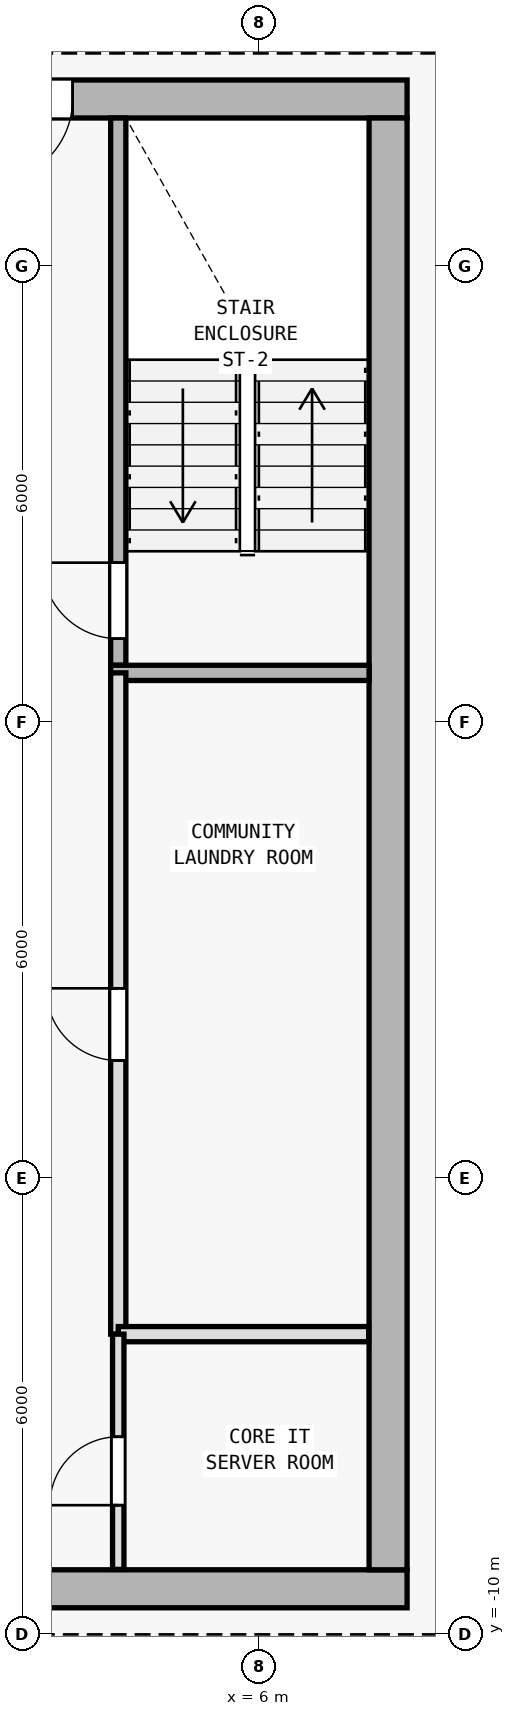
"""IFC4 building model, lengths in metres.
Left out: names, types, materials, properties, quantities, classifications, styles, units other than length and angle.
Written with IfcOpenShell. Run it as: python <this file> out.ifc"""

import sys

from ifc_helpers import new_model, si_unit, direction, frame, frame_2d, origin, origin_2d, place, context, subcontext, project, spatial, rectangle, i_section, extrude, element, fill, save


model = new_model("IFC4")
c1 = context("Model", 3, precision=1e-05, world=origin(), true_north=direction((0.0, 1.0)))
c2 = subcontext(c1, "Body", "Model", "MODEL_VIEW")
j1 = project(units=[si_unit("LENGTHUNIT", "METRE"), si_unit("PLANEANGLEUNIT", "RADIAN")], contexts=[c1])
p1 = place(None, origin())
s1 = spatial("IfcSite", under=j1, at=p1, CompositionType="ELEMENT")
p2 = place(p1, origin())
s2 = spatial("IfcBuilding", under=s1, at=p2, CompositionType="ELEMENT")
p3 = place(p2, frame((0.0, 0.0, 149.4)))
s3 = spatial("IfcBuildingStorey", under=s2, at=p3, CompositionType="ELEMENT", Elevation=149.4)
for number, where, z_axis, x_axis in (
    (1, (7.7, -9.4, 0.0), (0.0, 0.0, 1.0), (1.0, 0.0, 0.0)),
    (2, (7.7, 10.2, 0.0), (0.0, 0.0, 1.0), (1.0, 0.0, 0.0)),
    (3, (7.7, 0.4, 0.0), (0.0, 0.0, 1.0), (1.0, 0.0, 0.0)),
):
    element("IfcColumn", number, at=place(p3, frame(where, z_axis=z_axis, x_axis=x_axis)), inside=s3, PredefinedType="COLUMN", context=c2, shape_type="SweptSolid", body=[
        extrude(i_section(OverallWidth=0.404, OverallDepth=0.407, WebThickness=0.017, FlangeThickness=0.028, FilletRadius=0.015, at=origin_2d()), origin(), (0.0, 0.0, 1.0), 3.6),
    ])
p4 = place(p3, frame((-7.95, -9.4, 0.0), z_axis=(0.0, 0.0, 1.0), x_axis=(1.0, 0.0, 0.0)))
e4 = element("IfcWall", 4, at=p4, inside=s3, PredefinedType="SHEAR", context=c2, shape_type="SweptSolid", body=[
    extrude(rectangle(XDim=15.9, YDim=0.5, at=frame_2d((7.95, 0.0))), origin(), (0.0, 0.0, 1.0), 3.35),
])
p5 = place(p4, frame((9.6, 0.0, 0.0)))
e5 = element("IfcOpeningElement", 5, at=p5, cuts=e4, PredefinedType="OPENING", context=c2, shape_type="SweptSolid", body=[
    extrude(rectangle(XDim=1.5, YDim=2.2, at=frame_2d((0.75, 1.1))), frame((0.0, 0.26, 0.0), z_axis=(0.0, -1.0, 0.0), x_axis=(1.0, 0.0, 0.0)), (0.0, 0.0, 1.0), 0.52),
])
p6 = place(p3, frame((7.95, 10.2, 0.0), z_axis=(0.0, 0.0, 1.0), x_axis=(-1.0, 0.0, 0.0)))
e6 = element("IfcWall", 6, at=p6, inside=s3, PredefinedType="SHEAR", context=c2, shape_type="SweptSolid", body=[
    extrude(rectangle(XDim=15.9, YDim=0.5, at=frame_2d((7.95, 0.0))), origin(), (0.0, 0.0, 1.0), 3.35),
])
p7 = place(p6, frame((4.4, 0.0, 0.0)))
e7 = element("IfcOpeningElement", 7, at=p7, cuts=e6, PredefinedType="OPENING", context=c2, shape_type="SweptSolid", body=[
    extrude(rectangle(XDim=1.1, YDim=2.15, at=frame_2d((0.55, 1.075))), frame((0.0, 0.26, 0.0), z_axis=(0.0, -1.0, 0.0), x_axis=(1.0, 0.0, 0.0)), (0.0, 0.0, 1.0), 0.52),
])
p8 = place(p3, frame((7.7, 9.95, 0.0), z_axis=(0.0, 0.0, 1.0), x_axis=(0.0, -1.0, 0.0)))
e8 = element("IfcWall", 8, at=p8, inside=s3, PredefinedType="SHEAR", context=c2, shape_type="SweptSolid", body=[
    extrude(rectangle(XDim=19.1, YDim=0.5, at=frame_2d((9.55, 0.0))), origin(), (0.0, 0.0, 1.0), 3.35),
])
p9 = place(p3, frame((4.15, 2.75, 0.0), z_axis=(0.0, 0.0, 1.0), x_axis=(0.0, 1.0, 0.0)))
e9 = element("IfcWall", 9, at=p9, inside=s3, PredefinedType="SOLIDWALL", context=c2, shape_type="SweptSolid", body=[
    extrude(rectangle(XDim=7.2, YDim=0.2, at=frame_2d((3.6, 0.0))), origin(), (0.0, 0.0, 1.0), 3.35),
])
p10 = place(p9, frame((0.35, 0.0, 0.0)))
e10 = element("IfcOpeningElement", 10, at=p10, cuts=e9, PredefinedType="OPENING", context=c2, shape_type="SweptSolid", body=[
    extrude(rectangle(XDim=1.0, YDim=2.15, at=frame_2d((0.5, 1.075))), frame((0.0, 0.11, 0.0), z_axis=(0.0, -1.0, 0.0), x_axis=(1.0, 0.0, 0.0)), (0.0, 0.0, 1.0), 0.22),
])
p11 = place(p3, frame((4.05, 2.65, 0.0), z_axis=(0.0, 0.0, 1.0), x_axis=(1.0, 0.0, 0.0)))
e11 = element("IfcWall", 11, at=p11, inside=s3, PredefinedType="SOLIDWALL", context=c2, shape_type="SweptSolid", body=[
    extrude(rectangle(XDim=3.4, YDim=0.2, at=frame_2d((1.7, 0.0))), origin(), (0.0, 0.0, 1.0), 3.35),
])
p12 = place(p3, frame((4.15, -6.05, 0.0), z_axis=(0.0, 0.0, 1.0), x_axis=(0.0, 1.0, 0.0)))
e12 = element("IfcWall", 12, at=p12, inside=s3, PredefinedType="SOLIDWALL", context=c2, shape_type="SweptSolid", body=[
    extrude(rectangle(XDim=8.7, YDim=0.2, at=frame_2d((4.35, 0.0))), origin(), (0.0, 0.0, 1.0), 3.35),
])
p13 = place(p12, frame((3.6, 0.0, 0.0)))
e13 = element("IfcOpeningElement", 13, at=p13, cuts=e12, PredefinedType="OPENING", context=c2, shape_type="SweptSolid", body=[
    extrude(rectangle(XDim=0.95, YDim=2.1, at=frame_2d((0.475, 1.05))), frame((0.0, 0.11, 0.0), z_axis=(0.0, -1.0, 0.0), x_axis=(1.0, 0.0, 0.0)), (0.0, 0.0, 1.0), 0.22),
])
p14 = place(p3, frame((4.15, -6.05, 0.0), z_axis=(0.0, 0.0, 1.0), x_axis=(1.0, 0.0, 0.0)))
e14 = element("IfcWall", 14, at=p14, inside=s3, PredefinedType="SOLIDWALL", context=c2, shape_type="SweptSolid", body=[
    extrude(rectangle(XDim=3.295, YDim=0.2, at=frame_2d((1.647, 0.0))), origin(), (0.0, 0.0, 1.0), 3.35),
])
p15 = place(p3, frame((4.15, -9.145, 0.0), z_axis=(0.0, 0.0, 1.0), x_axis=(0.0, 1.0, 0.0)))
e15 = element("IfcWall", 15, at=p15, inside=s3, PredefinedType="PARTITIONING", context=c2, shape_type="SweptSolid", body=[
    extrude(rectangle(XDim=3.095, YDim=0.15, at=frame_2d((1.547, 0.0))), origin(), (0.0, 0.0, 1.0), 3.35),
])
p16 = place(p15, frame((0.845, 0.0, 0.0)))
e16 = element("IfcOpeningElement", 16, at=p16, cuts=e15, PredefinedType="OPENING", context=c2, shape_type="SweptSolid", body=[
    extrude(rectangle(XDim=0.9, YDim=2.1, at=frame_2d((0.45, 1.05))), frame((0.0, 0.085, 0.0), z_axis=(0.0, -1.0, 0.0), x_axis=(1.0, 0.0, 0.0)), (0.0, 0.0, 1.0), 0.17),
])
p17 = place(p3, frame((7.023, 12.36, 0.0), z_axis=(0.0, 0.0, 1.0), x_axis=(0.84376480085, -0.536713108511, 0.0)))
e17 = element("IfcWall", 17, at=p17, inside=s3, PredefinedType="PARTITIONING", context=c2, shape_type="SweptSolid", body=[
    extrude(rectangle(XDim=7.297, YDim=0.15, at=frame_2d((3.648, 0.0))), origin(), (0.0, 0.0, 1.0), 2.775),
])
p18 = place(p17, frame((3.198, 0.0, 0.0)))
e18 = element("IfcOpeningElement", 18, at=p18, cuts=e17, PredefinedType="OPENING", context=c2, shape_type="SweptSolid", body=[
    extrude(rectangle(XDim=0.9, YDim=2.1, at=frame_2d((0.45, 1.05))), frame((0.0, 0.085, 0.0), z_axis=(0.0, -1.0, 0.0), x_axis=(1.0, 0.0, 0.0)), (0.0, 0.0, 1.0), 0.17),
])
p19 = place(p7, origin())
e19 = element("IfcDoor", 19, at=p19, inside=s3, OperationType="SINGLE_SWING_RIGHT", PredefinedType="DOOR", context=c2, shape_type="SweptSolid", body=[
    extrude(rectangle(XDim=1.1, YDim=2.15, at=frame_2d((0.55, 1.075))), frame((0.0, 0.025, 0.0), z_axis=(0.0, -1.0, 0.0), x_axis=(1.0, 0.0, 0.0)), (0.0, 0.0, 1.0), 0.05),
])
fill(e7, e19)
p20 = place(p10, origin())
e20 = element("IfcDoor", 20, at=p20, inside=s3, OperationType="SINGLE_SWING_RIGHT", PredefinedType="DOOR", context=c2, shape_type="SweptSolid", body=[
    extrude(rectangle(XDim=1.0, YDim=2.15, at=frame_2d((0.5, 1.075))), frame((0.0, 0.025, 0.0), z_axis=(0.0, -1.0, 0.0), x_axis=(1.0, 0.0, 0.0)), (0.0, 0.0, 1.0), 0.05),
])
fill(e10, e20)
p21 = place(p13, origin())
e21 = element("IfcDoor", 21, at=p21, inside=s3, OperationType="SINGLE_SWING_RIGHT", PredefinedType="DOOR", context=c2, shape_type="SweptSolid", body=[
    extrude(rectangle(XDim=0.95, YDim=2.1, at=frame_2d((0.475, 1.05))), frame((0.0, 0.025, 0.0), z_axis=(0.0, -1.0, 0.0), x_axis=(1.0, 0.0, 0.0)), (0.0, 0.0, 1.0), 0.05),
])
fill(e13, e21)
p22 = place(p16, origin())
e22 = element("IfcDoor", 22, at=p22, inside=s3, OperationType="SINGLE_SWING_LEFT", PredefinedType="DOOR", context=c2, shape_type="SweptSolid", body=[
    extrude(rectangle(XDim=0.9, YDim=2.1, at=frame_2d((0.45, 1.05))), frame((0.0, 0.025, 0.0), z_axis=(0.0, -1.0, 0.0), x_axis=(1.0, 0.0, 0.0)), (0.0, 0.0, 1.0), 0.05),
])
fill(e16, e22)
save(model, sys.argv[1])
